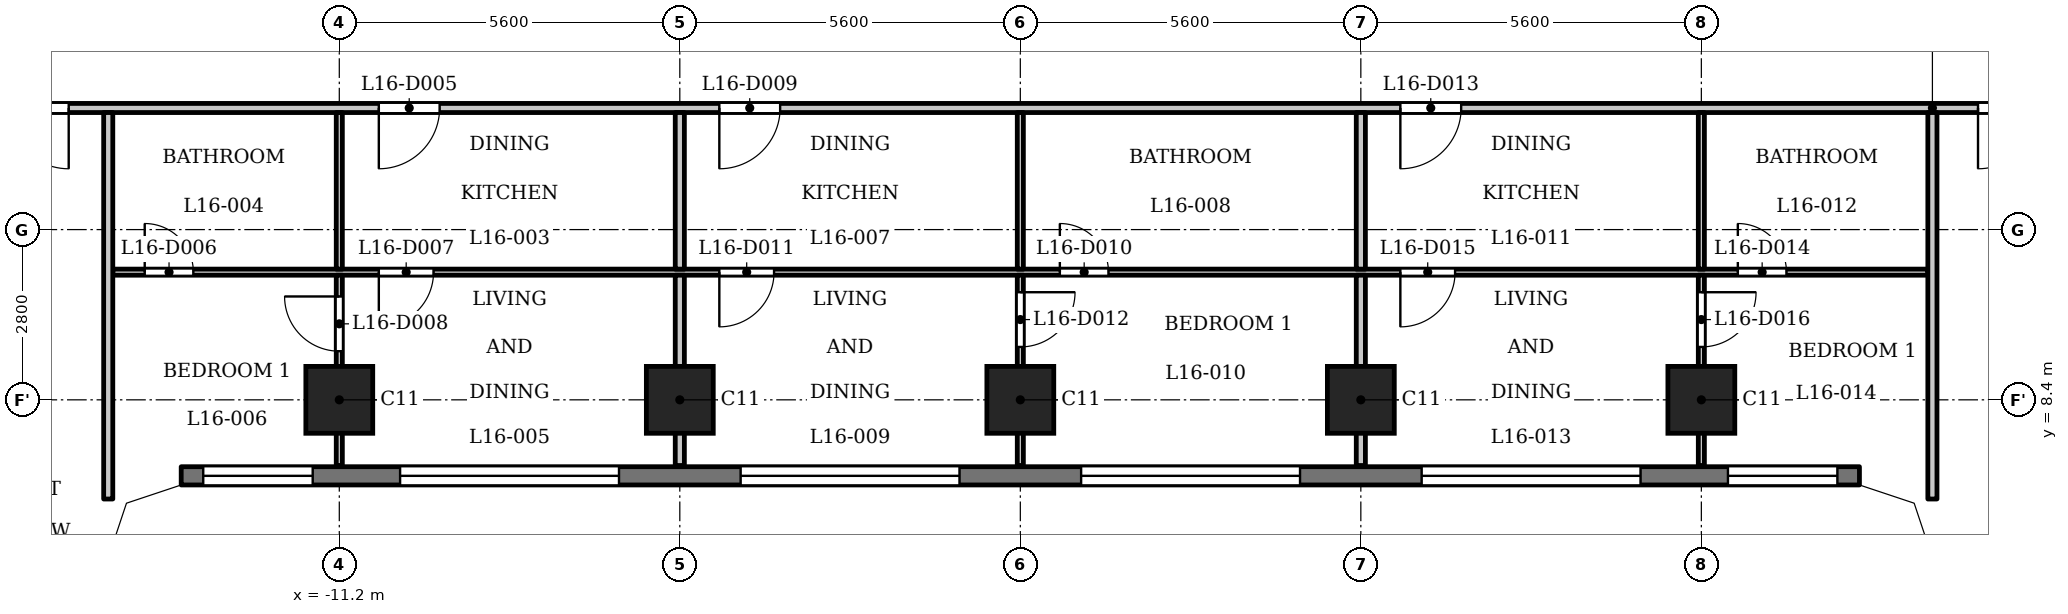
"""IFC4 building model, lengths in metres.
Left out: names, types, materials, properties, quantities, classifications, styles, units other than length and angle.
Written with IfcOpenShell. Run it as: python <this file> out.ifc"""

import sys

from ifc_helpers import new_model, si_unit, direction, frame, frame_2d, origin, origin_2d, place, context, subcontext, project, spatial, polyline, rectangle, outline, extrude, element, fill, save


model = new_model("IFC4")
c1 = context("Model", 3, precision=1e-05, world=origin(), true_north=direction((0.0, 1.0)))
c2 = subcontext(c1, "Body", "Model", "MODEL_VIEW")
j1 = project(units=[si_unit("LENGTHUNIT", "METRE"), si_unit("PLANEANGLEUNIT", "RADIAN")], contexts=[c1])
p1 = place(None, origin())
s1 = spatial("IfcSite", under=j1, at=p1, CompositionType="ELEMENT")
p2 = place(p1, origin())
s2 = spatial("IfcBuilding", under=s1, at=p2, CompositionType="ELEMENT")
p3 = place(p2, frame((0.0, 0.0, 65.5)))
s3 = spatial("IfcBuildingStorey", under=s2, at=p3, CompositionType="ELEMENT", Elevation=65.5)
for number, where, z_axis, x_axis in (
    (1, (-11.2, 8.4, 0.0), (0.0, 0.0, 1.0), (1.0, 0.0, 0.0)),
    (2, (-5.6, 8.4, 0.0), (0.0, 0.0, 1.0), (1.0, 0.0, 0.0)),
    (3, (0.0, 8.4, 0.0), (0.0, 0.0, 1.0), (1.0, 0.0, 0.0)),
    (4, (5.6, 8.4, 0.0), (0.0, 0.0, 1.0), (1.0, 0.0, 0.0)),
    (5, (11.2, 8.4, 0.0), (0.0, 0.0, 1.0), (1.0, 0.0, 0.0)),
):
    element("IfcColumn", number, at=place(p3, frame(where, z_axis=z_axis, x_axis=x_axis)), inside=s3, PredefinedType="COLUMN", context=c2, shape_type="SweptSolid", body=[
        extrude(rectangle(XDim=1.1, YDim=1.1, at=origin_2d()), origin(), (0.0, 0.0, 1.0), 3.5),
    ])
p4 = place(p3, frame((-13.8, 7.15, 0.0), z_axis=(0.0, 0.0, 1.0), x_axis=(1.0, 0.0, 0.0)))
e6 = element("IfcWall", 6, at=p4, inside=s3, PredefinedType="SOLIDWALL", context=c2, shape_type="SweptSolid", body=[
    extrude(rectangle(XDim=27.6, YDim=0.3, at=frame_2d((13.8, 0.0))), origin(), (0.0, 0.0, 1.0), 3.2),
])
p5 = place(p4, frame((0.363, 0.0, 0.9)))
e7 = element("IfcOpeningElement", 7, at=p5, cuts=e6, PredefinedType="OPENING", context=c2, shape_type="SweptSolid", body=[
    extrude(rectangle(XDim=1.8, YDim=1.25, at=frame_2d((0.9, 0.625))), frame((0.0, 0.16, 0.0), z_axis=(0.0, -1.0, 0.0), x_axis=(1.0, 0.0, 0.0)), (0.0, 0.0, 1.0), 0.32),
])
p6 = place(p4, frame((3.6, 0.0, 1.2)))
e8 = element("IfcOpeningElement", 8, at=p6, cuts=e6, PredefinedType="OPENING", context=c2, shape_type="SweptSolid", body=[
    extrude(rectangle(XDim=3.6, YDim=0.95, at=frame_2d((1.8, 0.475))), frame((0.0, 0.16, 0.0), z_axis=(0.0, -1.0, 0.0), x_axis=(1.0, 0.0, 0.0)), (0.0, 0.0, 1.0), 0.32),
])
p7 = place(p4, frame((9.2, 0.0, 1.2)))
e9 = element("IfcOpeningElement", 9, at=p7, cuts=e6, PredefinedType="OPENING", context=c2, shape_type="SweptSolid", body=[
    extrude(rectangle(XDim=3.6, YDim=0.95, at=frame_2d((1.8, 0.475))), frame((0.0, 0.16, 0.0), z_axis=(0.0, -1.0, 0.0), x_axis=(1.0, 0.0, 0.0)), (0.0, 0.0, 1.0), 0.32),
])
p8 = place(p4, frame((14.8, 0.0, 1.2)))
e10 = element("IfcOpeningElement", 10, at=p8, cuts=e6, PredefinedType="OPENING", context=c2, shape_type="SweptSolid", body=[
    extrude(rectangle(XDim=3.6, YDim=0.95, at=frame_2d((1.8, 0.475))), frame((0.0, 0.16, 0.0), z_axis=(0.0, -1.0, 0.0), x_axis=(1.0, 0.0, 0.0)), (0.0, 0.0, 1.0), 0.32),
])
p9 = place(p4, frame((20.4, 0.0, 1.2)))
e11 = element("IfcOpeningElement", 11, at=p9, cuts=e6, PredefinedType="OPENING", context=c2, shape_type="SweptSolid", body=[
    extrude(rectangle(XDim=3.6, YDim=0.95, at=frame_2d((1.8, 0.475))), frame((0.0, 0.16, 0.0), z_axis=(0.0, -1.0, 0.0), x_axis=(1.0, 0.0, 0.0)), (0.0, 0.0, 1.0), 0.32),
])
p10 = place(p4, frame((25.438, 0.0, 0.9)))
e12 = element("IfcOpeningElement", 12, at=p10, cuts=e6, PredefinedType="OPENING", context=c2, shape_type="SweptSolid", body=[
    extrude(rectangle(XDim=1.8, YDim=1.25, at=frame_2d((0.9, 0.625))), frame((0.0, 0.16, 0.0), z_axis=(0.0, -1.0, 0.0), x_axis=(1.0, 0.0, 0.0)), (0.0, 0.0, 1.0), 0.32),
])
p11 = place(p3, frame((-14.925, 10.5, 0.0), z_axis=(0.0, 0.0, 1.0), x_axis=(1.0, 0.0, 0.0)))
e13 = element("IfcWall", 13, at=p11, inside=s3, PredefinedType="PARTITIONING", context=c2, shape_type="SweptSolid", body=[
    extrude(rectangle(XDim=29.85, YDim=0.1, at=frame_2d((14.925, 0.0))), origin(), (0.0, 0.0, 1.0), 3.2),
])
p12 = place(p11, frame((0.525, 0.0, 0.0)))
e14 = element("IfcOpeningElement", 14, at=p12, cuts=e13, PredefinedType="OPENING", context=c2, shape_type="SweptSolid", body=[
    extrude(rectangle(XDim=0.8, YDim=2.1, at=frame_2d((0.4, 1.05))), frame((0.0, 0.06, 0.0), z_axis=(0.0, -1.0, 0.0), x_axis=(1.0, 0.0, 0.0)), (0.0, 0.0, 1.0), 0.12),
])
p13 = place(p11, frame((4.375, 0.0, 0.0)))
e15 = element("IfcOpeningElement", 15, at=p13, cuts=e13, PredefinedType="OPENING", context=c2, shape_type="SweptSolid", body=[
    extrude(rectangle(XDim=0.9, YDim=2.1, at=frame_2d((0.45, 1.05))), frame((0.0, 0.06, 0.0), z_axis=(0.0, -1.0, 0.0), x_axis=(1.0, 0.0, 0.0)), (0.0, 0.0, 1.0), 0.12),
])
p14 = place(p11, frame((15.575, 0.0, 0.0)))
e16 = element("IfcOpeningElement", 16, at=p14, cuts=e13, PredefinedType="OPENING", context=c2, shape_type="SweptSolid", body=[
    extrude(rectangle(XDim=0.8, YDim=2.1, at=frame_2d((0.4, 1.05))), frame((0.0, 0.06, 0.0), z_axis=(0.0, -1.0, 0.0), x_axis=(1.0, 0.0, 0.0)), (0.0, 0.0, 1.0), 0.12),
])
p15 = place(p11, frame((9.975, 0.0, 0.0)))
e17 = element("IfcOpeningElement", 17, at=p15, cuts=e13, PredefinedType="OPENING", context=c2, shape_type="SweptSolid", body=[
    extrude(rectangle(XDim=0.9, YDim=2.1, at=frame_2d((0.45, 1.05))), frame((0.0, 0.06, 0.0), z_axis=(0.0, -1.0, 0.0), x_axis=(1.0, 0.0, 0.0)), (0.0, 0.0, 1.0), 0.12),
])
p16 = place(p11, frame((26.725, 0.0, 0.0)))
e18 = element("IfcOpeningElement", 18, at=p16, cuts=e13, PredefinedType="OPENING", context=c2, shape_type="SweptSolid", body=[
    extrude(rectangle(XDim=0.8, YDim=2.1, at=frame_2d((0.4, 1.05))), frame((0.0, 0.06, 0.0), z_axis=(0.0, -1.0, 0.0), x_axis=(1.0, 0.0, 0.0)), (0.0, 0.0, 1.0), 0.12),
])
p17 = place(p11, frame((21.175, 0.0, 0.0)))
e19 = element("IfcOpeningElement", 19, at=p17, cuts=e13, PredefinedType="OPENING", context=c2, shape_type="SweptSolid", body=[
    extrude(rectangle(XDim=0.9, YDim=2.1, at=frame_2d((0.45, 1.05))), frame((0.0, 0.06, 0.0), z_axis=(0.0, -1.0, 0.0), x_axis=(1.0, 0.0, 0.0)), (0.0, 0.0, 1.0), 0.12),
])
p18 = place(p3, frame((-17.4, 13.2, 0.0), z_axis=(0.0, 0.0, 1.0), x_axis=(1.0, 0.0, 0.0)))
e20 = element("IfcWall", 20, at=p18, inside=s3, PredefinedType="PARTITIONING", context=c2, shape_type="SweptSolid", body=[
    extrude(rectangle(XDim=34.8, YDim=0.15, at=frame_2d((17.4, 0.0))), origin(), (0.0, 0.0, 1.0), 3.2),
])
p19 = place(p18, frame((0.75, 0.0, 0.0)))
e21 = element("IfcOpeningElement", 21, at=p19, cuts=e20, PredefinedType="OPENING", context=c2, shape_type="SweptSolid", body=[
    extrude(rectangle(XDim=1.0, YDim=2.1, at=frame_2d((0.5, 1.05))), frame((0.0, 0.085, 0.0), z_axis=(0.0, -1.0, 0.0), x_axis=(1.0, 0.0, 0.0)), (0.0, 0.0, 1.0), 0.17),
])
p20 = place(p18, frame((33.15, 0.0, 0.0)))
e22 = element("IfcOpeningElement", 22, at=p20, cuts=e20, PredefinedType="OPENING", context=c2, shape_type="SweptSolid", body=[
    extrude(rectangle(XDim=1.0, YDim=2.1, at=frame_2d((0.5, 1.05))), frame((0.0, 0.085, 0.0), z_axis=(0.0, -1.0, 0.0), x_axis=(1.0, 0.0, 0.0)), (0.0, 0.0, 1.0), 0.17),
])
p21 = place(p18, frame((6.85, 0.0, 0.0)))
e23 = element("IfcOpeningElement", 23, at=p21, cuts=e20, PredefinedType="OPENING", context=c2, shape_type="SweptSolid", body=[
    extrude(rectangle(XDim=1.0, YDim=2.1, at=frame_2d((0.5, 1.05))), frame((0.0, 0.085, 0.0), z_axis=(0.0, -1.0, 0.0), x_axis=(1.0, 0.0, 0.0)), (0.0, 0.0, 1.0), 0.17),
])
p22 = place(p18, frame((12.45, 0.0, 0.0)))
e24 = element("IfcOpeningElement", 24, at=p22, cuts=e20, PredefinedType="OPENING", context=c2, shape_type="SweptSolid", body=[
    extrude(rectangle(XDim=1.0, YDim=2.1, at=frame_2d((0.5, 1.05))), frame((0.0, 0.085, 0.0), z_axis=(0.0, -1.0, 0.0), x_axis=(1.0, 0.0, 0.0)), (0.0, 0.0, 1.0), 0.17),
])
p23 = place(p18, frame((23.65, 0.0, 0.0)))
e25 = element("IfcOpeningElement", 25, at=p23, cuts=e20, PredefinedType="OPENING", context=c2, shape_type="SweptSolid", body=[
    extrude(rectangle(XDim=1.0, YDim=2.1, at=frame_2d((0.5, 1.05))), frame((0.0, 0.085, 0.0), z_axis=(0.0, -1.0, 0.0), x_axis=(1.0, 0.0, 0.0)), (0.0, 0.0, 1.0), 0.17),
])
p24 = place(p3, frame((-15.0, 6.769, 0.0), z_axis=(0.0, 0.0, 1.0), x_axis=(0.0, 1.0, 0.0)))
e26 = element("IfcWall", 26, at=p24, inside=s3, PredefinedType="PARTITIONING", context=c2, shape_type="SweptSolid", body=[
    extrude(rectangle(XDim=6.356, YDim=0.15, at=frame_2d((3.178, 0.0))), origin(), (0.0, 0.0, 1.0), 3.2),
])
p25 = place(p3, frame((-11.2, 7.32, 0.0), z_axis=(0.0, 0.0, 1.0), x_axis=(0.0, 1.0, 0.0)))
e27 = element("IfcWall", 27, at=p25, inside=s3, PredefinedType="PARTITIONING", context=c2, shape_type="SweptSolid", body=[
    extrude(rectangle(XDim=3.13, YDim=0.1, at=frame_2d((1.565, 0.0))), origin(), (0.0, 0.0, 1.0), 3.2),
])
p26 = place(p25, frame((1.88, 0.0, 0.0)))
e28 = element("IfcOpeningElement", 28, at=p26, cuts=e27, PredefinedType="OPENING", context=c2, shape_type="SweptSolid", body=[
    extrude(rectangle(XDim=0.9, YDim=2.1, at=frame_2d((0.45, 1.05))), frame((0.0, 0.06, 0.0), z_axis=(0.0, -1.0, 0.0), x_axis=(1.0, 0.0, 0.0)), (0.0, 0.0, 1.0), 0.12),
])
p27 = place(p3, frame((-11.2, 10.55, 0.0), z_axis=(0.0, 0.0, 1.0), x_axis=(0.0, 1.0, 0.0)))
e29 = element("IfcWall", 29, at=p27, inside=s3, PredefinedType="PARTITIONING", context=c2, shape_type="SweptSolid", body=[
    extrude(rectangle(XDim=2.575, YDim=0.1, at=frame_2d((1.288, 0.0))), origin(), (0.0, 0.0, 1.0), 3.2),
])
p28 = place(p3, frame((-5.6, 7.32, 0.0), z_axis=(0.0, 0.0, 1.0), x_axis=(0.0, 1.0, 0.0)))
e30 = element("IfcWall", 30, at=p28, inside=s3, PredefinedType="PARTITIONING", context=c2, shape_type="SweptSolid", body=[
    extrude(rectangle(XDim=3.13, YDim=0.15, at=frame_2d((1.565, 0.0))), origin(), (0.0, 0.0, 1.0), 3.2),
])
p29 = place(p3, frame((-5.6, 10.55, 0.0), z_axis=(0.0, 0.0, 1.0), x_axis=(0.0, 1.0, 0.0)))
e31 = element("IfcWall", 31, at=p29, inside=s3, PredefinedType="PARTITIONING", context=c2, shape_type="SweptSolid", body=[
    extrude(rectangle(XDim=2.575, YDim=0.15, at=frame_2d((1.288, 0.0))), origin(), (0.0, 0.0, 1.0), 3.2),
])
p30 = place(p3, frame((0.0, 7.32, 0.0), z_axis=(0.0, 0.0, 1.0), x_axis=(0.0, 1.0, 0.0)))
e32 = element("IfcWall", 32, at=p30, inside=s3, PredefinedType="PARTITIONING", context=c2, shape_type="SweptSolid", body=[
    extrude(rectangle(XDim=3.13, YDim=0.1, at=frame_2d((1.565, 0.0))), origin(), (0.0, 0.0, 1.0), 3.2),
])
p31 = place(p30, frame((1.95, 0.0, 0.0)))
e33 = element("IfcOpeningElement", 33, at=p31, cuts=e32, PredefinedType="OPENING", context=c2, shape_type="SweptSolid", body=[
    extrude(rectangle(XDim=0.9, YDim=2.1, at=frame_2d((0.45, 1.05))), frame((0.0, 0.06, 0.0), z_axis=(0.0, -1.0, 0.0), x_axis=(1.0, 0.0, 0.0)), (0.0, 0.0, 1.0), 0.12),
])
p32 = place(p3, frame((0.0, 10.55, 0.0), z_axis=(0.0, 0.0, 1.0), x_axis=(0.0, 1.0, 0.0)))
e34 = element("IfcWall", 34, at=p32, inside=s3, PredefinedType="PARTITIONING", context=c2, shape_type="SweptSolid", body=[
    extrude(rectangle(XDim=2.575, YDim=0.1, at=frame_2d((1.288, 0.0))), origin(), (0.0, 0.0, 1.0), 3.2),
])
p33 = place(p3, frame((5.6, 7.32, 0.0), z_axis=(0.0, 0.0, 1.0), x_axis=(0.0, 1.0, 0.0)))
e35 = element("IfcWall", 35, at=p33, inside=s3, PredefinedType="PARTITIONING", context=c2, shape_type="SweptSolid", body=[
    extrude(rectangle(XDim=3.13, YDim=0.15, at=frame_2d((1.565, 0.0))), origin(), (0.0, 0.0, 1.0), 3.2),
])
p34 = place(p3, frame((5.6, 10.55, 0.0), z_axis=(0.0, 0.0, 1.0), x_axis=(0.0, 1.0, 0.0)))
e36 = element("IfcWall", 36, at=p34, inside=s3, PredefinedType="PARTITIONING", context=c2, shape_type="SweptSolid", body=[
    extrude(rectangle(XDim=2.575, YDim=0.15, at=frame_2d((1.288, 0.0))), origin(), (0.0, 0.0, 1.0), 3.2),
])
p35 = place(p3, frame((11.2, 7.32, 0.0), z_axis=(0.0, 0.0, 1.0), x_axis=(0.0, 1.0, 0.0)))
e37 = element("IfcWall", 37, at=p35, inside=s3, PredefinedType="PARTITIONING", context=c2, shape_type="SweptSolid", body=[
    extrude(rectangle(XDim=3.13, YDim=0.1, at=frame_2d((1.565, 0.0))), origin(), (0.0, 0.0, 1.0), 3.2),
])
p36 = place(p35, frame((1.95, 0.0, 0.0)))
e38 = element("IfcOpeningElement", 38, at=p36, cuts=e37, PredefinedType="OPENING", context=c2, shape_type="SweptSolid", body=[
    extrude(rectangle(XDim=0.9, YDim=2.1, at=frame_2d((0.45, 1.05))), frame((0.0, 0.06, 0.0), z_axis=(0.0, -1.0, 0.0), x_axis=(1.0, 0.0, 0.0)), (0.0, 0.0, 1.0), 0.12),
])
p37 = place(p3, frame((11.2, 10.55, 0.0), z_axis=(0.0, 0.0, 1.0), x_axis=(0.0, 1.0, 0.0)))
e39 = element("IfcWall", 39, at=p37, inside=s3, PredefinedType="PARTITIONING", context=c2, shape_type="SweptSolid", body=[
    extrude(rectangle(XDim=2.575, YDim=0.1, at=frame_2d((1.288, 0.0))), origin(), (0.0, 0.0, 1.0), 3.2),
])
p38 = place(p3, frame((15.0, 6.769, 0.0), z_axis=(0.0, 0.0, 1.0), x_axis=(0.0, 1.0, 0.0)))
e40 = element("IfcWall", 40, at=p38, inside=s3, PredefinedType="PARTITIONING", context=c2, shape_type="SweptSolid", body=[
    extrude(rectangle(XDim=6.356, YDim=0.15, at=frame_2d((3.178, 0.0))), origin(), (0.0, 0.0, 1.0), 3.2),
])
p39 = place(p3, origin())
e41 = element("IfcWall", 41, at=p39, inside=s3, PredefinedType="SOLIDWALL", context=c2, shape_type="SweptSolid", body=[
    extrude(outline(polyline([(-13.849, 7.3), (-14.937, 6.937), (-15.3, 5.849), (-15.3, 5.8), (-15.0, 5.8), (-14.7, 6.7), (-13.8, 7.0), (-13.8, 7.3), (-13.849, 7.3)])), origin(), (0.0, 0.0, 1.0), 3.2),
])
e42 = element("IfcWall", 42, at=p39, inside=s3, PredefinedType="SOLIDWALL", context=c2, shape_type="SweptSolid", body=[
    extrude(outline(polyline([(14.937, 6.937), (13.849, 7.3), (13.8, 7.3), (13.8, 7.0), (14.7, 6.7), (15.0, 5.8), (15.3, 5.8), (15.3, 5.849), (14.937, 6.937)])), origin(), (0.0, 0.0, 1.0), 3.2),
])
p40 = place(p19, origin())
e43 = element("IfcDoor", 43, at=p40, inside=s3, OperationType="SINGLE_SWING_RIGHT", PredefinedType="DOOR", context=c2, shape_type="SweptSolid", body=[
    extrude(rectangle(XDim=1.0, YDim=2.1, at=frame_2d((0.5, 1.05))), frame((0.0, 0.025, 0.0), z_axis=(0.0, -1.0, 0.0), x_axis=(1.0, 0.0, 0.0)), (0.0, 0.0, 1.0), 0.05),
])
fill(e21, e43)
p41 = place(p20, origin())
e44 = element("IfcDoor", 44, at=p41, inside=s3, OperationType="SINGLE_SWING_LEFT", PredefinedType="DOOR", context=c2, shape_type="SweptSolid", body=[
    extrude(rectangle(XDim=1.0, YDim=2.1, at=frame_2d((0.5, 1.05))), frame((0.0, 0.025, 0.0), z_axis=(0.0, -1.0, 0.0), x_axis=(1.0, 0.0, 0.0)), (0.0, 0.0, 1.0), 0.05),
])
fill(e22, e44)
p42 = place(p21, origin())
e45 = element("IfcDoor", 45, at=p42, inside=s3, OperationType="SINGLE_SWING_LEFT", PredefinedType="DOOR", context=c2, shape_type="SweptSolid", body=[
    extrude(rectangle(XDim=1.0, YDim=2.1, at=frame_2d((0.5, 1.05))), frame((0.0, 0.025, 0.0), z_axis=(0.0, -1.0, 0.0), x_axis=(1.0, 0.0, 0.0)), (0.0, 0.0, 1.0), 0.05),
])
fill(e23, e45)
p43 = place(p12, origin())
e46 = element("IfcDoor", 46, at=p43, inside=s3, OperationType="SINGLE_SWING_RIGHT", PredefinedType="DOOR", context=c2, shape_type="SweptSolid", body=[
    extrude(rectangle(XDim=0.8, YDim=2.1, at=frame_2d((0.4, 1.05))), frame((0.0, 0.025, 0.0), z_axis=(0.0, -1.0, 0.0), x_axis=(1.0, 0.0, 0.0)), (0.0, 0.0, 1.0), 0.05),
])
fill(e14, e46)
p44 = place(p13, origin())
e47 = element("IfcDoor", 47, at=p44, inside=s3, OperationType="SINGLE_SWING_LEFT", PredefinedType="DOOR", context=c2, shape_type="SweptSolid", body=[
    extrude(rectangle(XDim=0.9, YDim=2.1, at=frame_2d((0.45, 1.05))), frame((0.0, 0.025, 0.0), z_axis=(0.0, -1.0, 0.0), x_axis=(1.0, 0.0, 0.0)), (0.0, 0.0, 1.0), 0.05),
])
fill(e15, e47)
p45 = place(p26, origin())
e48 = element("IfcDoor", 48, at=p45, inside=s3, OperationType="SINGLE_SWING_LEFT", PredefinedType="DOOR", context=c2, shape_type="SweptSolid", body=[
    extrude(rectangle(XDim=0.9, YDim=2.1, at=frame_2d((0.45, 1.05))), frame((0.0, 0.025, 0.0), z_axis=(0.0, -1.0, 0.0), x_axis=(1.0, 0.0, 0.0)), (0.0, 0.0, 1.0), 0.05),
])
fill(e28, e48)
p46 = place(p22, origin())
e49 = element("IfcDoor", 49, at=p46, inside=s3, OperationType="SINGLE_SWING_LEFT", PredefinedType="DOOR", context=c2, shape_type="SweptSolid", body=[
    extrude(rectangle(XDim=1.0, YDim=2.1, at=frame_2d((0.5, 1.05))), frame((0.0, 0.025, 0.0), z_axis=(0.0, -1.0, 0.0), x_axis=(1.0, 0.0, 0.0)), (0.0, 0.0, 1.0), 0.05),
])
fill(e24, e49)
p47 = place(p14, origin())
e50 = element("IfcDoor", 50, at=p47, inside=s3, OperationType="SINGLE_SWING_RIGHT", PredefinedType="DOOR", context=c2, shape_type="SweptSolid", body=[
    extrude(rectangle(XDim=0.8, YDim=2.1, at=frame_2d((0.4, 1.05))), frame((0.0, 0.025, 0.0), z_axis=(0.0, -1.0, 0.0), x_axis=(1.0, 0.0, 0.0)), (0.0, 0.0, 1.0), 0.05),
])
fill(e16, e50)
p48 = place(p15, origin())
e51 = element("IfcDoor", 51, at=p48, inside=s3, OperationType="SINGLE_SWING_LEFT", PredefinedType="DOOR", context=c2, shape_type="SweptSolid", body=[
    extrude(rectangle(XDim=0.9, YDim=2.1, at=frame_2d((0.45, 1.05))), frame((0.0, 0.025, 0.0), z_axis=(0.0, -1.0, 0.0), x_axis=(1.0, 0.0, 0.0)), (0.0, 0.0, 1.0), 0.05),
])
fill(e17, e51)
p49 = place(p31, origin())
e52 = element("IfcDoor", 52, at=p49, inside=s3, OperationType="SINGLE_SWING_RIGHT", PredefinedType="DOOR", context=c2, shape_type="SweptSolid", body=[
    extrude(rectangle(XDim=0.9, YDim=2.1, at=frame_2d((0.45, 1.05))), frame((0.0, 0.025, 0.0), z_axis=(0.0, -1.0, 0.0), x_axis=(1.0, 0.0, 0.0)), (0.0, 0.0, 1.0), 0.05),
])
fill(e33, e52)
p50 = place(p23, origin())
e53 = element("IfcDoor", 53, at=p50, inside=s3, OperationType="SINGLE_SWING_LEFT", PredefinedType="DOOR", context=c2, shape_type="SweptSolid", body=[
    extrude(rectangle(XDim=1.0, YDim=2.1, at=frame_2d((0.5, 1.05))), frame((0.0, 0.025, 0.0), z_axis=(0.0, -1.0, 0.0), x_axis=(1.0, 0.0, 0.0)), (0.0, 0.0, 1.0), 0.05),
])
fill(e25, e53)
p51 = place(p16, origin())
e54 = element("IfcDoor", 54, at=p51, inside=s3, OperationType="SINGLE_SWING_RIGHT", PredefinedType="DOOR", context=c2, shape_type="SweptSolid", body=[
    extrude(rectangle(XDim=0.8, YDim=2.1, at=frame_2d((0.4, 1.05))), frame((0.0, 0.025, 0.0), z_axis=(0.0, -1.0, 0.0), x_axis=(1.0, 0.0, 0.0)), (0.0, 0.0, 1.0), 0.05),
])
fill(e18, e54)
p52 = place(p17, origin())
e55 = element("IfcDoor", 55, at=p52, inside=s3, OperationType="SINGLE_SWING_LEFT", PredefinedType="DOOR", context=c2, shape_type="SweptSolid", body=[
    extrude(rectangle(XDim=0.9, YDim=2.1, at=frame_2d((0.45, 1.05))), frame((0.0, 0.025, 0.0), z_axis=(0.0, -1.0, 0.0), x_axis=(1.0, 0.0, 0.0)), (0.0, 0.0, 1.0), 0.05),
])
fill(e19, e55)
p53 = place(p36, origin())
e56 = element("IfcDoor", 56, at=p53, inside=s3, OperationType="SINGLE_SWING_RIGHT", PredefinedType="DOOR", context=c2, shape_type="SweptSolid", body=[
    extrude(rectangle(XDim=0.9, YDim=2.1, at=frame_2d((0.45, 1.05))), frame((0.0, 0.025, 0.0), z_axis=(0.0, -1.0, 0.0), x_axis=(1.0, 0.0, 0.0)), (0.0, 0.0, 1.0), 0.05),
])
fill(e38, e56)
p54 = place(p5, origin())
e57 = element("IfcWindow", 57, at=p54, inside=s3, PartitioningType="SINGLE_PANEL", PredefinedType="WINDOW", context=c2, shape_type="SweptSolid", body=[
    extrude(rectangle(XDim=1.8, YDim=1.25, at=frame_2d((0.9, 0.625))), frame((0.0, 0.03, 0.0), z_axis=(0.0, -1.0, 0.0), x_axis=(1.0, 0.0, 0.0)), (0.0, 0.0, 1.0), 0.06),
])
fill(e7, e57)
p55 = place(p6, origin())
e58 = element("IfcWindow", 58, at=p55, inside=s3, PartitioningType="SINGLE_PANEL", PredefinedType="WINDOW", context=c2, shape_type="SweptSolid", body=[
    extrude(rectangle(XDim=3.6, YDim=0.95, at=frame_2d((1.8, 0.475))), frame((0.0, 0.03, 0.0), z_axis=(0.0, -1.0, 0.0), x_axis=(1.0, 0.0, 0.0)), (0.0, 0.0, 1.0), 0.06),
])
fill(e8, e58)
p56 = place(p7, origin())
e59 = element("IfcWindow", 59, at=p56, inside=s3, PartitioningType="SINGLE_PANEL", PredefinedType="WINDOW", context=c2, shape_type="SweptSolid", body=[
    extrude(rectangle(XDim=3.6, YDim=0.95, at=frame_2d((1.8, 0.475))), frame((0.0, 0.03, 0.0), z_axis=(0.0, -1.0, 0.0), x_axis=(1.0, 0.0, 0.0)), (0.0, 0.0, 1.0), 0.06),
])
fill(e9, e59)
p57 = place(p8, origin())
e60 = element("IfcWindow", 60, at=p57, inside=s3, PartitioningType="SINGLE_PANEL", PredefinedType="WINDOW", context=c2, shape_type="SweptSolid", body=[
    extrude(rectangle(XDim=3.6, YDim=0.95, at=frame_2d((1.8, 0.475))), frame((0.0, 0.03, 0.0), z_axis=(0.0, -1.0, 0.0), x_axis=(1.0, 0.0, 0.0)), (0.0, 0.0, 1.0), 0.06),
])
fill(e10, e60)
p58 = place(p9, origin())
e61 = element("IfcWindow", 61, at=p58, inside=s3, PartitioningType="SINGLE_PANEL", PredefinedType="WINDOW", context=c2, shape_type="SweptSolid", body=[
    extrude(rectangle(XDim=3.6, YDim=0.95, at=frame_2d((1.8, 0.475))), frame((0.0, 0.03, 0.0), z_axis=(0.0, -1.0, 0.0), x_axis=(1.0, 0.0, 0.0)), (0.0, 0.0, 1.0), 0.06),
])
fill(e11, e61)
p59 = place(p10, origin())
e62 = element("IfcWindow", 62, at=p59, inside=s3, PartitioningType="SINGLE_PANEL", PredefinedType="WINDOW", context=c2, shape_type="SweptSolid", body=[
    extrude(rectangle(XDim=1.8, YDim=1.25, at=frame_2d((0.9, 0.625))), frame((0.0, 0.03, 0.0), z_axis=(0.0, -1.0, 0.0), x_axis=(1.0, 0.0, 0.0)), (0.0, 0.0, 1.0), 0.06),
])
fill(e12, e62)
save(model, sys.argv[1])
